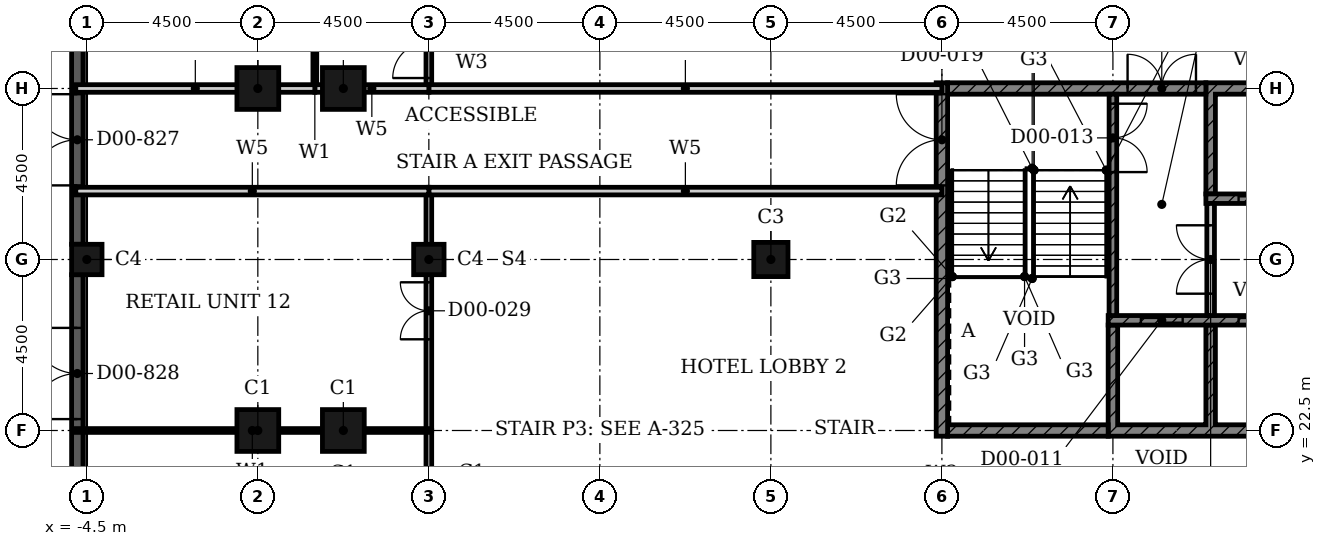
"""IFC4 building model, lengths in metres.
Left out: names, types, materials, properties, quantities, classifications, styles, units other than length and angle.
Written with IfcOpenShell. Run it as: python <this file> out.ifc"""

import sys

from ifc_helpers import new_model, si_unit, direction, frame, frame_2d, origin, origin_2d, place, context, subcontext, project, spatial, polyline, rectangle, hollow_rectangle, outline, extrude, element, fill, save


model = new_model("IFC4")
c1 = context("Model", 3, precision=1e-05, world=origin(), true_north=direction((0.0, 1.0)))
c2 = subcontext(c1, "Body", "Model", "MODEL_VIEW")
j1 = project(units=[si_unit("LENGTHUNIT", "METRE"), si_unit("PLANEANGLEUNIT", "RADIAN")], contexts=[c1])
p1 = place(None, origin())
s1 = spatial("IfcSite", under=j1, at=p1, CompositionType="ELEMENT")
p2 = place(p1, origin())
s2 = spatial("IfcBuilding", under=s1, at=p2, CompositionType="ELEMENT")
p3 = place(p2, origin())
s3 = spatial("IfcBuildingStorey", under=s2, at=p3, CompositionType="ELEMENT", Elevation=0.0)
for number, where, z_axis, x_axis in (
    (1, (2.25, 31.5, 0.0), (0.0, 0.0, 1.0), (1.0, 0.0, 0.0)),
    (2, (0.0, 31.5, 0.0), (0.0, 0.0, 1.0), (1.0, 0.0, 0.0)),
    (3, (0.0, 22.5, 0.0), (0.0, 0.0, 1.0), (1.0, 0.0, 0.0)),
    (4, (2.25, 22.5, 0.0), (0.0, 0.0, 1.0), (1.0, 0.0, 0.0)),
):
    element("IfcColumn", number, at=place(p3, frame(where, z_axis=z_axis, x_axis=x_axis)), inside=s3, PredefinedType="COLUMN", context=c2, shape_type="SweptSolid", body=[
        extrude(hollow_rectangle(XDim=1.1, YDim=1.1, WallThickness=0.036, at=origin_2d()), origin(), (0.0, 0.0, 1.0), 6.6),
    ])
p4 = place(p3, frame((13.5, 27.0, 0.0), z_axis=(0.0, 0.0, 1.0), x_axis=(1.0, 0.0, 0.0)))
e5 = element("IfcColumn", 5, at=p4, inside=s3, PredefinedType="COLUMN", context=c2, shape_type="SweptSolid", body=[
    extrude(hollow_rectangle(XDim=0.9, YDim=0.9, WallThickness=0.028, at=origin_2d()), origin(), (0.0, 0.0, 1.0), 6.6),
])
for number, where, z_axis, x_axis in (
    (6, (-4.5, 27.0, 0.0), (0.0, 0.0, 1.0), (1.0, 0.0, 0.0)),
    (7, (4.5, 27.0, 0.0), (0.0, 0.0, 1.0), (1.0, 0.0, 0.0)),
):
    element("IfcColumn", number, at=place(p3, frame(where, z_axis=z_axis, x_axis=x_axis)), inside=s3, PredefinedType="COLUMN", context=c2, shape_type="SweptSolid", body=[
        extrude(hollow_rectangle(XDim=0.8, YDim=0.8, WallThickness=0.025, at=origin_2d()), origin(), (0.0, 0.0, 1.0), 6.6),
    ])
p5 = place(p3, frame((-4.75, 27.4, 0.0), z_axis=(0.0, 0.0, 1.0), x_axis=(0.0, 1.0, 0.0)))
e8 = element("IfcWall", 8, at=p5, inside=s3, PredefinedType="SOLIDWALL", context=c2, shape_type="SweptSolid", body=[
    extrude(rectangle(XDim=8.2, YDim=0.3, at=frame_2d((4.1, 0.0))), origin(), (0.0, 0.0, 1.0), 6.6),
])
p6 = place(p5, frame((1.55, 0.0, 0.0)))
e9 = element("IfcOpeningElement", 9, at=p6, cuts=e8, PredefinedType="OPENING", context=c2, shape_type="SweptSolid", body=[
    extrude(rectangle(XDim=2.4, YDim=2.4, at=frame_2d((1.2, 1.2))), frame((0.0, 0.16, 0.0), z_axis=(0.0, -1.0, 0.0), x_axis=(1.0, 0.0, 0.0)), (0.0, 0.0, 1.0), 0.32),
])
p7 = place(p3, frame((-4.75, 18.4, 0.0), z_axis=(0.0, 0.0, 1.0), x_axis=(0.0, 1.0, 0.0)))
e10 = element("IfcWall", 10, at=p7, inside=s3, PredefinedType="SOLIDWALL", context=c2, shape_type="SweptSolid", body=[
    extrude(rectangle(XDim=8.2, YDim=0.3, at=frame_2d((4.1, 0.0))), origin(), (0.0, 0.0, 1.0), 6.6),
])
p8 = place(p7, frame((4.4, 0.0, 0.0)))
e11 = element("IfcOpeningElement", 11, at=p8, cuts=e10, PredefinedType="OPENING", context=c2, shape_type="SweptSolid", body=[
    extrude(rectangle(XDim=2.4, YDim=2.4, at=frame_2d((1.2, 1.2))), frame((0.0, 0.16, 0.0), z_axis=(0.0, -1.0, 0.0), x_axis=(1.0, 0.0, 0.0)), (0.0, 0.0, 1.0), 0.32),
])
p9 = place(p3, origin())
e12 = element("IfcWall", 12, at=p9, inside=s3, PredefinedType="SHEAR", context=c2, shape_type="SweptSolid", body=[
    extrude(outline(polyline([(22.375, 22.35), (38.053, 22.35), (38.053, 25.275), (37.803, 25.275), (37.803, 22.65), (35.482, 22.65), (35.482, 25.275), (35.232, 25.275), (35.232, 22.65), (32.911, 22.65), (32.911, 25.275), (32.661, 25.275), (32.661, 22.65), (30.339, 22.65), (30.339, 25.275), (30.089, 25.275), (30.089, 22.65), (27.768, 22.65), (27.768, 25.275), (27.518, 25.275), (27.518, 22.65), (25.197, 22.65), (25.197, 25.275), (24.947, 25.275), (24.947, 22.65), (22.625, 22.65), (22.625, 25.275), (22.375, 25.275), (22.375, 22.35)])), origin(), (0.0, 0.0, 1.0), 6.25),
])
p10 = place(p3, origin())
e13 = element("IfcWall", 13, at=p10, inside=s3, PredefinedType="SHEAR", context=c2, shape_type="SweptSolid", body=[
    extrude(outline(polyline([(24.947, 28.725), (25.197, 28.725), (25.197, 31.35), (27.518, 31.35), (27.518, 28.725), (27.768, 28.725), (27.768, 31.35), (30.089, 31.35), (30.089, 28.725), (30.339, 28.725), (30.339, 31.35), (32.661, 31.35), (32.661, 28.725), (32.911, 28.725), (32.911, 31.35), (35.232, 31.35), (35.232, 28.725), (35.482, 28.725), (35.482, 31.35), (37.803, 31.35), (37.803, 28.725), (38.053, 28.725), (38.053, 31.35), (40.375, 31.35), (40.375, 28.725), (40.625, 28.725), (40.625, 31.65), (24.947, 31.65), (24.947, 28.725)])), origin(), (0.0, 0.0, 1.0), 6.25),
])
p11 = place(p3, frame((18.15, 22.5, 0.0), z_axis=(0.0, 0.0, 1.0), x_axis=(1.0, 0.0, 0.0)))
e14 = element("IfcWall", 14, at=p11, inside=s3, PredefinedType="SHEAR", context=c2, shape_type="SweptSolid", body=[
    extrude(rectangle(XDim=4.225, YDim=0.3, at=frame_2d((2.113, 0.0))), origin(), (0.0, 0.0, 1.0), 6.25),
])
p12 = place(p3, frame((18.15, 31.5, 0.0), z_axis=(0.0, 0.0, 1.0), x_axis=(1.0, 0.0, 0.0)))
e15 = element("IfcWall", 15, at=p12, inside=s3, PredefinedType="SHEAR", context=c2, shape_type="SweptSolid", body=[
    extrude(rectangle(XDim=6.797, YDim=0.3, at=frame_2d((3.398, 0.0))), origin(), (0.0, 0.0, 1.0), 6.25),
])
p13 = place(p12, frame((4.736, 0.0, 0.0)))
e16 = element("IfcOpeningElement", 16, at=p13, cuts=e15, PredefinedType="OPENING", context=c2, shape_type="SweptSolid", body=[
    extrude(rectangle(XDim=1.8, YDim=2.1, at=frame_2d((0.9, 1.05))), frame((0.0, 0.16, 0.0), z_axis=(0.0, -1.0, 0.0), x_axis=(1.0, 0.0, 0.0)), (0.0, 0.0, 1.0), 0.32),
])
p14 = place(p3, frame((18.0, 22.35, 0.0), z_axis=(0.0, 0.0, 1.0), x_axis=(0.0, 1.0, 0.0)))
e17 = element("IfcWall", 17, at=p14, inside=s3, PredefinedType="SHEAR", context=c2, shape_type="SweptSolid", body=[
    extrude(rectangle(XDim=9.3, YDim=0.3, at=frame_2d((4.65, 0.0))), origin(), (0.0, 0.0, 1.0), 6.25),
])
p15 = place(p14, frame((6.6, 0.0, 0.0)))
e18 = element("IfcOpeningElement", 18, at=p15, cuts=e17, PredefinedType="OPENING", context=c2, shape_type="SweptSolid", body=[
    extrude(rectangle(XDim=2.4, YDim=2.4, at=frame_2d((1.2, 1.2))), frame((0.0, 0.16, 0.0), z_axis=(0.0, -1.0, 0.0), x_axis=(1.0, 0.0, 0.0)), (0.0, 0.0, 1.0), 0.32),
])
p16 = place(p3, frame((22.375, 25.4, 0.0), z_axis=(0.0, 0.0, 1.0), x_axis=(1.0, 0.0, 0.0)))
e19 = element("IfcWall", 19, at=p16, inside=s3, PredefinedType="SHEAR", context=c2, shape_type="SweptSolid", body=[
    extrude(rectangle(XDim=15.678, YDim=0.25, at=frame_2d((7.839, 0.0))), origin(), (0.0, 0.0, 1.0), 6.25),
])
p17 = place(p16, frame((3.432, 0.0, 0.0)))
e20 = element("IfcOpeningElement", 20, at=p17, cuts=e19, PredefinedType="OPENING", context=c2, shape_type="SweptSolid", body=[
    extrude(rectangle(XDim=1.1, YDim=2.1, at=frame_2d((0.55, 1.05))), frame((0.0, 0.135, 0.0), z_axis=(0.0, -1.0, 0.0), x_axis=(1.0, 0.0, 0.0)), (0.0, 0.0, 1.0), 0.27),
])
p18 = place(p16, frame((11.146, 0.0, 0.0)))
e21 = element("IfcOpeningElement", 21, at=p18, cuts=e19, PredefinedType="OPENING", context=c2, shape_type="SweptSolid", body=[
    extrude(rectangle(XDim=1.1, YDim=2.1, at=frame_2d((0.55, 1.05))), frame((0.0, 0.135, 0.0), z_axis=(0.0, -1.0, 0.0), x_axis=(1.0, 0.0, 0.0)), (0.0, 0.0, 1.0), 0.27),
])
p19 = place(p16, frame((13.718, 0.0, 0.0)))
e22 = element("IfcOpeningElement", 22, at=p19, cuts=e19, PredefinedType="OPENING", context=c2, shape_type="SweptSolid", body=[
    extrude(rectangle(XDim=1.1, YDim=2.1, at=frame_2d((0.55, 1.05))), frame((0.0, 0.135, 0.0), z_axis=(0.0, -1.0, 0.0), x_axis=(1.0, 0.0, 0.0)), (0.0, 0.0, 1.0), 0.27),
])
p20 = place(p16, frame((8.575, 0.0, 0.0)))
e23 = element("IfcOpeningElement", 23, at=p20, cuts=e19, PredefinedType="OPENING", context=c2, shape_type="SweptSolid", body=[
    extrude(rectangle(XDim=1.1, YDim=2.1, at=frame_2d((0.55, 1.05))), frame((0.0, 0.135, 0.0), z_axis=(0.0, -1.0, 0.0), x_axis=(1.0, 0.0, 0.0)), (0.0, 0.0, 1.0), 0.27),
])
p21 = place(p16, frame((6.004, 0.0, 0.0)))
e24 = element("IfcOpeningElement", 24, at=p21, cuts=e19, PredefinedType="OPENING", context=c2, shape_type="SweptSolid", body=[
    extrude(rectangle(XDim=1.1, YDim=2.1, at=frame_2d((0.55, 1.05))), frame((0.0, 0.135, 0.0), z_axis=(0.0, -1.0, 0.0), x_axis=(1.0, 0.0, 0.0)), (0.0, 0.0, 1.0), 0.27),
])
p22 = place(p16, frame((0.861, 0.0, 0.0)))
e25 = element("IfcOpeningElement", 25, at=p22, cuts=e19, PredefinedType="OPENING", context=c2, shape_type="SweptSolid", body=[
    extrude(rectangle(XDim=1.1, YDim=2.1, at=frame_2d((0.55, 1.05))), frame((0.0, 0.135, 0.0), z_axis=(0.0, -1.0, 0.0), x_axis=(1.0, 0.0, 0.0)), (0.0, 0.0, 1.0), 0.27),
])
p23 = place(p3, frame((24.947, 28.6, 0.0), z_axis=(0.0, 0.0, 1.0), x_axis=(1.0, 0.0, 0.0)))
e26 = element("IfcWall", 26, at=p23, inside=s3, PredefinedType="SHEAR", context=c2, shape_type="SweptSolid", body=[
    extrude(rectangle(XDim=15.678, YDim=0.25, at=frame_2d((7.839, 0.0))), origin(), (0.0, 0.0, 1.0), 6.25),
])
p24 = place(p23, frame((0.861, 0.0, 0.0)))
e27 = element("IfcOpeningElement", 27, at=p24, cuts=e26, PredefinedType="OPENING", context=c2, shape_type="SweptSolid", body=[
    extrude(rectangle(XDim=1.1, YDim=2.1, at=frame_2d((0.55, 1.05))), frame((0.0, 0.135, 0.0), z_axis=(0.0, -1.0, 0.0), x_axis=(1.0, 0.0, 0.0)), (0.0, 0.0, 1.0), 0.27),
])
p25 = place(p23, frame((8.575, 0.0, 0.0)))
e28 = element("IfcOpeningElement", 28, at=p25, cuts=e26, PredefinedType="OPENING", context=c2, shape_type="SweptSolid", body=[
    extrude(rectangle(XDim=1.1, YDim=2.1, at=frame_2d((0.55, 1.05))), frame((0.0, 0.135, 0.0), z_axis=(0.0, -1.0, 0.0), x_axis=(1.0, 0.0, 0.0)), (0.0, 0.0, 1.0), 0.27),
])
p26 = place(p23, frame((6.004, 0.0, 0.0)))
e29 = element("IfcOpeningElement", 29, at=p26, cuts=e26, PredefinedType="OPENING", context=c2, shape_type="SweptSolid", body=[
    extrude(rectangle(XDim=1.1, YDim=2.1, at=frame_2d((0.55, 1.05))), frame((0.0, 0.135, 0.0), z_axis=(0.0, -1.0, 0.0), x_axis=(1.0, 0.0, 0.0)), (0.0, 0.0, 1.0), 0.27),
])
p27 = place(p23, frame((11.146, 0.0, 0.0)))
e30 = element("IfcOpeningElement", 30, at=p27, cuts=e26, PredefinedType="OPENING", context=c2, shape_type="SweptSolid", body=[
    extrude(rectangle(XDim=1.1, YDim=2.1, at=frame_2d((0.55, 1.05))), frame((0.0, 0.135, 0.0), z_axis=(0.0, -1.0, 0.0), x_axis=(1.0, 0.0, 0.0)), (0.0, 0.0, 1.0), 0.27),
])
p28 = place(p23, frame((3.432, 0.0, 0.0)))
e31 = element("IfcOpeningElement", 31, at=p28, cuts=e26, PredefinedType="OPENING", context=c2, shape_type="SweptSolid", body=[
    extrude(rectangle(XDim=1.1, YDim=2.1, at=frame_2d((0.55, 1.05))), frame((0.0, 0.135, 0.0), z_axis=(0.0, -1.0, 0.0), x_axis=(1.0, 0.0, 0.0)), (0.0, 0.0, 1.0), 0.27),
])
p29 = place(p23, frame((13.718, 0.0, 0.0)))
e32 = element("IfcOpeningElement", 32, at=p29, cuts=e26, PredefinedType="OPENING", context=c2, shape_type="SweptSolid", body=[
    extrude(rectangle(XDim=1.1, YDim=2.1, at=frame_2d((0.55, 1.05))), frame((0.0, 0.135, 0.0), z_axis=(0.0, -1.0, 0.0), x_axis=(1.0, 0.0, 0.0)), (0.0, 0.0, 1.0), 0.27),
])
p30 = place(p3, frame((22.5, 31.35, 0.0), z_axis=(0.0, 0.0, 1.0), x_axis=(0.0, -1.0, 0.0)))
e33 = element("IfcWall", 33, at=p30, inside=s3, PredefinedType="SHEAR", context=c2, shape_type="SweptSolid", body=[
    extrude(rectangle(XDim=5.825, YDim=0.2, at=frame_2d((2.913, 0.0))), origin(), (0.0, 0.0, 1.0), 6.25),
])
p31 = place(p30, frame((0.25, 0.0, 0.0)))
e34 = element("IfcOpeningElement", 34, at=p31, cuts=e33, PredefinedType="OPENING", context=c2, shape_type="SweptSolid", body=[
    extrude(rectangle(XDim=1.8, YDim=2.1, at=frame_2d((0.9, 1.05))), frame((0.0, 0.11, 0.0), z_axis=(0.0, -1.0, 0.0), x_axis=(1.0, 0.0, 0.0)), (0.0, 0.0, 1.0), 0.22),
])
p32 = place(p3, frame((25.072, 25.525, 0.0), z_axis=(0.0, 0.0, 1.0), x_axis=(0.0, 1.0, 0.0)))
e35 = element("IfcWall", 35, at=p32, inside=s3, PredefinedType="PARTITIONING", context=c2, shape_type="SweptSolid", body=[
    extrude(rectangle(XDim=2.95, YDim=0.2, at=frame_2d((1.475, 0.0))), origin(), (0.0, 0.0, 1.0), 6.25),
])
p33 = place(p32, frame((0.575, 0.0, 0.0)))
e36 = element("IfcOpeningElement", 36, at=p33, cuts=e35, PredefinedType="OPENING", context=c2, shape_type="SweptSolid", body=[
    extrude(rectangle(XDim=1.8, YDim=2.1, at=frame_2d((0.9, 1.05))), frame((0.0, 0.11, 0.0), z_axis=(0.0, -1.0, 0.0), x_axis=(1.0, 0.0, 0.0)), (0.0, 0.0, 1.0), 0.22),
])
p34 = place(p3, frame((4.5, 4.5, 0.0), z_axis=(0.0, 0.0, 1.0), x_axis=(0.0, 1.0, 0.0)))
e37 = element("IfcWall", 37, at=p34, inside=s3, PredefinedType="PARTITIONING", context=c2, shape_type="SweptSolid", body=[
    extrude(rectangle(XDim=18.0, YDim=0.15, at=frame_2d((9.0, 0.0))), origin(), (0.0, 0.0, 1.0), 6.25),
])
p35 = place(p34, frame((8.25, 0.0, 0.0)))
e38 = element("IfcOpeningElement", 38, at=p35, cuts=e37, PredefinedType="OPENING", context=c2, shape_type="SweptSolid", body=[
    extrude(rectangle(XDim=1.5, YDim=2.4, at=frame_2d((0.75, 1.2))), frame((0.0, 0.085, 0.0), z_axis=(0.0, -1.0, 0.0), x_axis=(1.0, 0.0, 0.0)), (0.0, 0.0, 1.0), 0.17),
])
p36 = place(p3, frame((4.5, 22.5, 0.0), z_axis=(0.0, 0.0, 1.0), x_axis=(0.0, 1.0, 0.0)))
e39 = element("IfcWall", 39, at=p36, inside=s3, PredefinedType="PARTITIONING", context=c2, shape_type="SweptSolid", body=[
    extrude(rectangle(XDim=6.3, YDim=0.15, at=frame_2d((3.15, 0.0))), origin(), (0.0, 0.0, 1.0), 6.25),
])
p37 = place(p36, frame((2.4, 0.0, 0.0)))
e40 = element("IfcOpeningElement", 40, at=p37, cuts=e39, PredefinedType="OPENING", context=c2, shape_type="SweptSolid", body=[
    extrude(rectangle(XDim=1.5, YDim=2.4, at=frame_2d((0.75, 1.2))), frame((0.0, 0.085, 0.0), z_axis=(0.0, -1.0, 0.0), x_axis=(1.0, 0.0, 0.0)), (0.0, 0.0, 1.0), 0.17),
])
p38 = place(p3, frame((4.5, 31.5, 0.0), z_axis=(0.0, 0.0, 1.0), x_axis=(0.0, 1.0, 0.0)))
e41 = element("IfcWall", 41, at=p38, inside=s3, PredefinedType="PARTITIONING", context=c2, shape_type="SweptSolid", body=[
    extrude(rectangle(XDim=2.4, YDim=0.15, at=frame_2d((1.2, 0.0))), origin(), (0.0, 0.0, 1.0), 6.25),
])
p39 = place(p38, frame((0.275, 0.0, 0.0)))
e42 = element("IfcOpeningElement", 42, at=p39, cuts=e41, PredefinedType="OPENING", context=c2, shape_type="SweptSolid", body=[
    extrude(rectangle(XDim=0.95, YDim=2.1, at=frame_2d((0.475, 1.05))), frame((0.0, 0.085, 0.0), z_axis=(0.0, -1.0, 0.0), x_axis=(1.0, 0.0, 0.0)), (0.0, 0.0, 1.0), 0.17),
])
p40 = place(p3, frame((-4.79, 22.5, 0.0), z_axis=(0.0, 0.0, 1.0), x_axis=(1.0, 0.0, 0.0)))
e43 = element("IfcWall", 43, at=p40, inside=s3, PredefinedType="PARTITIONING", context=c2, shape_type="SweptSolid", body=[
    extrude(rectangle(XDim=9.29, YDim=0.1, at=frame_2d((4.645, 0.0))), origin(), (0.0, 0.0, 1.0), 6.25),
])
p41 = place(p3, frame((1.5, 31.5, 0.0), z_axis=(0.0, 0.0, 1.0), x_axis=(0.0, 1.0, 0.0)))
e44 = element("IfcWall", 44, at=p41, inside=s3, PredefinedType="PARTITIONING", context=c2, shape_type="SweptSolid", body=[
    extrude(rectangle(XDim=2.4, YDim=0.1, at=frame_2d((1.2, 0.0))), origin(), (0.0, 0.0, 1.0), 6.25),
])
p42 = place(p3, frame((4.5, 28.8, 0.0), z_axis=(0.0, 0.0, 1.0), x_axis=(1.0, 0.0, 0.0)))
e45 = element("IfcWall", 45, at=p42, inside=s3, PredefinedType="PARTITIONING", context=c2, shape_type="SweptSolid", body=[
    extrude(rectangle(XDim=13.5, YDim=0.2, at=frame_2d((6.75, 0.0))), origin(), (0.0, 0.0, 1.0), 6.25),
])
p43 = place(p3, frame((-4.79, 28.8, 0.0), z_axis=(0.0, 0.0, 1.0), x_axis=(1.0, 0.0, 0.0)))
e46 = element("IfcWall", 46, at=p43, inside=s3, PredefinedType="PARTITIONING", context=c2, shape_type="SweptSolid", body=[
    extrude(rectangle(XDim=9.29, YDim=0.2, at=frame_2d((4.645, 0.0))), origin(), (0.0, 0.0, 1.0), 6.25),
])
p44 = place(p3, frame((4.5, 31.5, 0.0), z_axis=(0.0, 0.0, 1.0), x_axis=(1.0, 0.0, 0.0)))
e47 = element("IfcWall", 47, at=p44, inside=s3, PredefinedType="PARTITIONING", context=c2, shape_type="SweptSolid", body=[
    extrude(rectangle(XDim=13.5, YDim=0.2, at=frame_2d((6.75, 0.0))), origin(), (0.0, 0.0, 1.0), 6.25),
])
p45 = place(p3, frame((1.5, 31.5, 0.0), z_axis=(0.0, 0.0, 1.0), x_axis=(1.0, 0.0, 0.0)))
e48 = element("IfcWall", 48, at=p45, inside=s3, PredefinedType="PARTITIONING", context=c2, shape_type="SweptSolid", body=[
    extrude(rectangle(XDim=3.0, YDim=0.2, at=frame_2d((1.5, 0.0))), origin(), (0.0, 0.0, 1.0), 6.25),
])
p46 = place(p3, frame((-4.79, 31.5, 0.0), z_axis=(0.0, 0.0, 1.0), x_axis=(1.0, 0.0, 0.0)))
e49 = element("IfcWall", 49, at=p46, inside=s3, PredefinedType="PARTITIONING", context=c2, shape_type="SweptSolid", body=[
    extrude(rectangle(XDim=6.29, YDim=0.2, at=frame_2d((3.145, 0.0))), origin(), (0.0, 0.0, 1.0), 6.25),
])
p47 = place(p6, origin())
e50 = element("IfcDoor", 50, at=p47, inside=s3, OperationType="DOUBLE_DOOR_SINGLE_SWING", PredefinedType="DOOR", context=c2, shape_type="SweptSolid", body=[
    extrude(rectangle(XDim=2.4, YDim=2.4, at=frame_2d((1.2, 1.2))), frame((0.0, 0.025, 0.0), z_axis=(0.0, -1.0, 0.0), x_axis=(1.0, 0.0, 0.0)), (0.0, 0.0, 1.0), 0.05),
])
fill(e9, e50)
p48 = place(p8, origin())
e51 = element("IfcDoor", 51, at=p48, inside=s3, OperationType="DOUBLE_DOOR_SINGLE_SWING", PredefinedType="DOOR", context=c2, shape_type="SweptSolid", body=[
    extrude(rectangle(XDim=2.4, YDim=2.4, at=frame_2d((1.2, 1.2))), frame((0.0, 0.025, 0.0), z_axis=(0.0, -1.0, 0.0), x_axis=(1.0, 0.0, 0.0)), (0.0, 0.0, 1.0), 0.05),
])
fill(e11, e51)
p49 = place(p17, origin())
e52 = element("IfcDoor", 52, at=p49, inside=s3, OperationType="DOUBLE_DOOR_SLIDING", PredefinedType="DOOR", context=c2, shape_type="SweptSolid", body=[
    extrude(rectangle(XDim=1.1, YDim=2.1, at=frame_2d((0.55, 1.05))), frame((0.0, 0.025, 0.0), z_axis=(0.0, -1.0, 0.0), x_axis=(1.0, 0.0, 0.0)), (0.0, 0.0, 1.0), 0.05),
])
fill(e20, e52)
p50 = place(p24, origin())
e53 = element("IfcDoor", 53, at=p50, inside=s3, OperationType="DOUBLE_DOOR_SLIDING", PredefinedType="DOOR", context=c2, shape_type="SweptSolid", body=[
    extrude(rectangle(XDim=1.1, YDim=2.1, at=frame_2d((0.55, 1.05))), frame((0.0, 0.025, 0.0), z_axis=(0.0, -1.0, 0.0), x_axis=(1.0, 0.0, 0.0)), (0.0, 0.0, 1.0), 0.05),
])
fill(e27, e53)
p51 = place(p22, origin())
e54 = element("IfcDoor", 54, at=p51, inside=s3, OperationType="DOUBLE_DOOR_SLIDING", PredefinedType="DOOR", context=c2, shape_type="SweptSolid", body=[
    extrude(rectangle(XDim=1.1, YDim=2.1, at=frame_2d((0.55, 1.05))), frame((0.0, 0.025, 0.0), z_axis=(0.0, -1.0, 0.0), x_axis=(1.0, 0.0, 0.0)), (0.0, 0.0, 1.0), 0.05),
])
fill(e25, e54)
p52 = place(p31, origin())
e55 = element("IfcDoor", 55, at=p52, inside=s3, OperationType="DOUBLE_DOOR_SINGLE_SWING", PredefinedType="DOOR", context=c2, shape_type="SweptSolid", body=[
    extrude(rectangle(XDim=1.8, YDim=2.1, at=frame_2d((0.9, 1.05))), frame((0.0, 0.025, 0.0), z_axis=(0.0, -1.0, 0.0), x_axis=(1.0, 0.0, 0.0)), (0.0, 0.0, 1.0), 0.05),
])
fill(e34, e55)
p53 = place(p33, origin())
e56 = element("IfcDoor", 56, at=p53, inside=s3, OperationType="DOUBLE_DOOR_SINGLE_SWING", PredefinedType="DOOR", context=c2, shape_type="SweptSolid", body=[
    extrude(rectangle(XDim=1.8, YDim=2.1, at=frame_2d((0.9, 1.05))), frame((0.0, 0.025, 0.0), z_axis=(0.0, -1.0, 0.0), x_axis=(1.0, 0.0, 0.0)), (0.0, 0.0, 1.0), 0.05),
])
fill(e36, e56)
p54 = place(p13, origin())
e57 = element("IfcDoor", 57, at=p54, inside=s3, OperationType="DOUBLE_DOOR_SINGLE_SWING", PredefinedType="DOOR", context=c2, shape_type="SweptSolid", body=[
    extrude(rectangle(XDim=1.8, YDim=2.1, at=frame_2d((0.9, 1.05))), frame((0.0, 0.025, 0.0), z_axis=(0.0, -1.0, 0.0), x_axis=(1.0, 0.0, 0.0)), (0.0, 0.0, 1.0), 0.05),
])
fill(e16, e57)
p55 = place(p15, origin())
e58 = element("IfcDoor", 58, at=p55, inside=s3, OperationType="DOUBLE_DOOR_SINGLE_SWING", PredefinedType="DOOR", context=c2, shape_type="SweptSolid", body=[
    extrude(rectangle(XDim=2.4, YDim=2.4, at=frame_2d((1.2, 1.2))), frame((0.0, 0.025, 0.0), z_axis=(0.0, -1.0, 0.0), x_axis=(1.0, 0.0, 0.0)), (0.0, 0.0, 1.0), 0.05),
])
fill(e18, e58)
p56 = place(p37, origin())
e59 = element("IfcDoor", 59, at=p56, inside=s3, OperationType="DOUBLE_DOOR_SINGLE_SWING", PredefinedType="DOOR", context=c2, shape_type="SweptSolid", body=[
    extrude(rectangle(XDim=1.5, YDim=2.4, at=frame_2d((0.75, 1.2))), frame((0.0, 0.025, 0.0), z_axis=(0.0, -1.0, 0.0), x_axis=(1.0, 0.0, 0.0)), (0.0, 0.0, 1.0), 0.05),
])
fill(e40, e59)
p57 = place(p39, origin())
e60 = element("IfcDoor", 60, at=p57, inside=s3, OperationType="SINGLE_SWING_LEFT", PredefinedType="DOOR", context=c2, shape_type="SweptSolid", body=[
    extrude(rectangle(XDim=0.95, YDim=2.1, at=frame_2d((0.475, 1.05))), frame((0.0, 0.025, 0.0), z_axis=(0.0, -1.0, 0.0), x_axis=(1.0, 0.0, 0.0)), (0.0, 0.0, 1.0), 0.05),
])
fill(e42, e60)
save(model, sys.argv[1])
